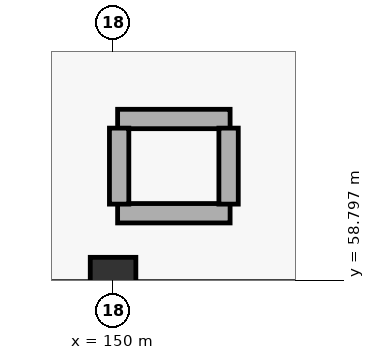
"""IFC4 building model, lengths in metres.
Left out: names, types, materials, properties, quantities, classifications, styles, units other than length and angle.
Written with IfcOpenShell. Run it as: python <this file> out.ifc"""

import sys

from ifc_helpers import new_model, si_unit, direction, frame, frame_2d, origin, origin_2d, place, context, subcontext, project, spatial, rectangle, extrude, element, save


model = new_model("IFC4")
c1 = context("Model", 3, precision=1e-05, world=origin(), true_north=direction((0.0, 1.0)))
c2 = subcontext(c1, "Body", "Model", "MODEL_VIEW")
j1 = project(units=[si_unit("LENGTHUNIT", "METRE"), si_unit("PLANEANGLEUNIT", "RADIAN")], contexts=[c1])
p1 = place(None, origin())
s1 = spatial("IfcSite", under=j1, at=p1, CompositionType="ELEMENT")
p2 = place(p1, origin())
s2 = spatial("IfcBuilding", under=s1, at=p2, CompositionType="ELEMENT")
p3 = place(p2, frame((0.0, 0.0, 26.4)))
s3 = spatial("IfcBuildingStorey", under=s2, at=p3, CompositionType="ELEMENT", Elevation=26.4)
p4 = place(p3, frame((150.0, 58.8, 0.0), z_axis=(0.0, 0.0, 1.0), x_axis=(1.0, 0.0, 0.0)))
e1 = element("IfcColumn", 1, at=p4, inside=s3, PredefinedType="COLUMN", context=c2, shape_type="SweptSolid", body=[
    extrude(rectangle(XDim=0.6, YDim=0.6, at=origin_2d()), origin(), (0.0, 0.0, 1.0), 4.5),
])
for number, where, z_axis, x_axis in (
    (2, (150.06, 60.92, 0.0), (0.0, 0.0, 1.0), (1.0, 0.0, 0.0)),
    (3, (150.06, 59.68, 0.0), (0.0, 0.0, 1.0), (1.0, 0.0, 0.0)),
):
    element("IfcWall", number, at=place(p3, frame(where, z_axis=z_axis, x_axis=x_axis)), inside=s3, PredefinedType="PARTITIONING", context=c2, shape_type="SweptSolid", body=[
        extrude(rectangle(XDim=1.48, YDim=0.255, at=frame_2d((0.74, 0.0))), origin(), (0.0, 0.0, 1.0), 3.74),
    ])
p5 = place(p3, frame((150.08, 59.8, 0.0), z_axis=(0.0, 0.0, 1.0), x_axis=(0.0, 1.0, 0.0)))
e4 = element("IfcWall", 4, at=p5, inside=s3, PredefinedType="PARTITIONING", context=c2, shape_type="SweptSolid", body=[
    extrude(rectangle(XDim=1.0, YDim=0.255, at=frame_2d((0.5, 0.0))), origin(), (0.0, 0.0, 1.0), 3.74),
])
p6 = place(p3, frame((151.52, 59.8, 0.0), z_axis=(0.0, 0.0, 1.0), x_axis=(0.0, 1.0, 0.0)))
e5 = element("IfcWall", 5, at=p6, inside=s3, PredefinedType="PARTITIONING", context=c2, shape_type="SweptSolid", body=[
    extrude(rectangle(XDim=1.0, YDim=0.255, at=frame_2d((0.5, 0.0))), origin(), (0.0, 0.0, 1.0), 4.2),
])
save(model, sys.argv[1])
